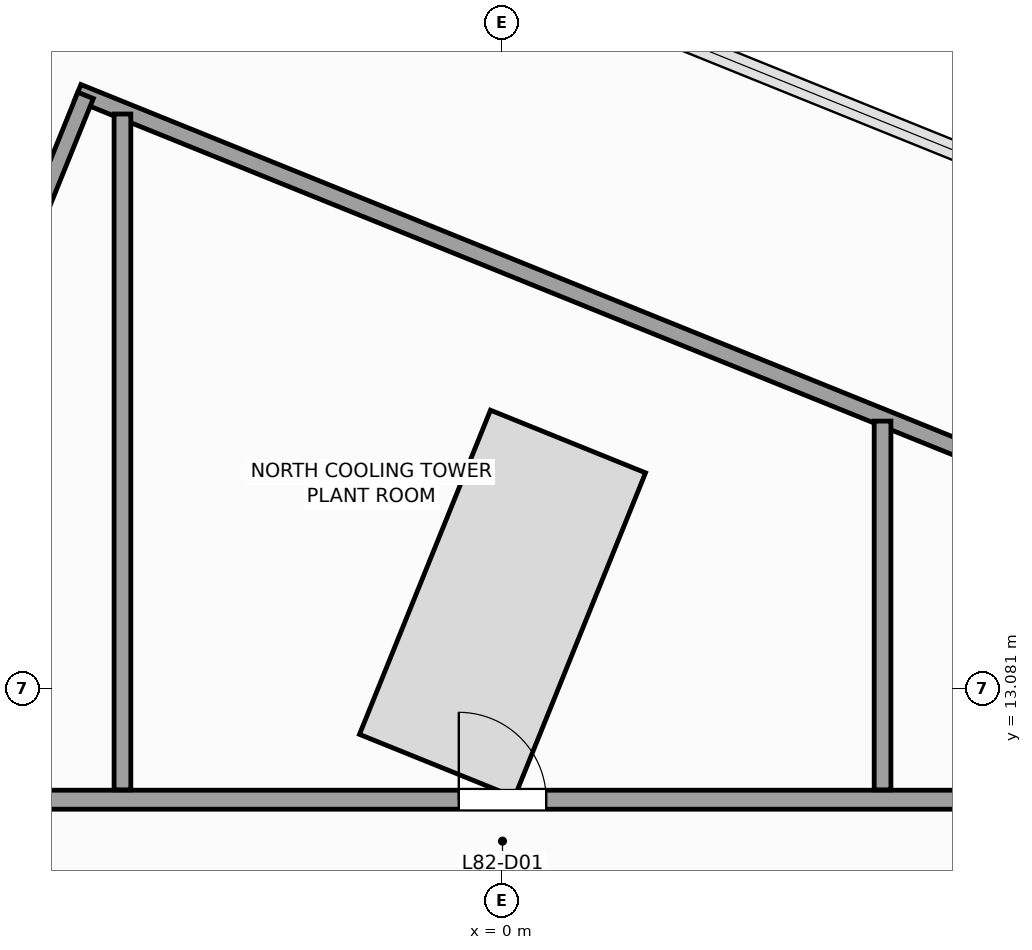
"""IFC4 building model, lengths in metres.
Left out: names, types, materials, properties, quantities, classifications, styles, units other than length and angle.
Written with IfcOpenShell. Run it as: python <this file> out.ifc"""

import sys

from ifc_helpers import new_model, si_unit, direction, frame, frame_2d, origin, place, context, subcontext, project, spatial, rectangle, extrude, source, transform, mapped, element, fill, save


model = new_model("IFC4")
c1 = context("Model", 3, precision=1e-05, world=origin(), true_north=direction((0.0, 1.0)))
c2 = subcontext(c1, "Body", "Model", "MODEL_VIEW")
j1 = project(units=[si_unit("LENGTHUNIT", "METRE"), si_unit("PLANEANGLEUNIT", "RADIAN")], contexts=[c1])
p1 = place(None, origin())
s1 = spatial("IfcSite", under=j1, at=p1, CompositionType="ELEMENT")
p2 = place(p1, origin())
s2 = spatial("IfcBuilding", under=s1, at=p2, CompositionType="ELEMENT")
p3 = place(p2, frame((0.0, 0.0, 333.6)))
s3 = spatial("IfcBuildingStorey", under=s2, at=p3, CompositionType="ELEMENT", Elevation=333.6)
p4 = place(p3, frame((18.556, 11.172, 0.0), z_axis=(0.0, 0.0, 1.0), x_axis=(-0.927181788521, 0.374611707018, 0.0)))
e1 = element("IfcWall", 1, at=p4, inside=s3, PredefinedType="PARTITIONING", context=c2, shape_type="SweptSolid", body=[
    extrude(rectangle(XDim=26.04, YDim=0.22, at=frame_2d((13.02, 0.0))), origin(), (0.0, 0.0, 1.0), 3.05),
])
p5 = place(p3, frame((-5.486, 20.886, 0.0), z_axis=(0.0, 0.0, 1.0), x_axis=(-0.374593321469, -0.927189216671, 0.0)))
e2 = element("IfcWall", 2, at=p5, inside=s3, PredefinedType="PARTITIONING", context=c2, shape_type="SweptSolid", body=[
    extrude(rectangle(XDim=4.4, YDim=0.22, at=frame_2d((2.2, 0.0))), origin(), (0.0, 0.0, 1.0), 3.7),
])
p6 = place(p3, frame((-10.32, 11.62, 0.0), z_axis=(0.0, 0.0, 1.0), x_axis=(1.0, 0.0, 0.0)))
e3 = element("IfcWall", 3, at=p6, inside=s3, PredefinedType="PARTITIONING", context=c2, shape_type="SweptSolid", body=[
    extrude(rectangle(XDim=21.94, YDim=0.25, at=frame_2d((10.97, 0.0))), origin(), (0.0, 0.0, 1.0), 3.7),
])
p7 = place(p6, frame((9.745, 0.0, 0.0)))
e4 = element("IfcOpeningElement", 4, at=p7, cuts=e3, PredefinedType="OPENING", context=c2, shape_type="SweptSolid", body=[
    extrude(rectangle(XDim=1.15, YDim=2.25, at=frame_2d((0.575, 1.125))), frame((0.0, 0.135, 0.0), z_axis=(0.0, -1.0, 0.0), x_axis=(1.0, 0.0, 0.0)), (0.0, 0.0, 1.0), 0.27),
])
p8 = place(p3, frame((-5.0, 11.75, 0.0), z_axis=(0.0, 0.0, 1.0), x_axis=(0.0, 1.0, 0.0)))
e5 = element("IfcWall", 5, at=p8, inside=s3, PredefinedType="PARTITIONING", context=c2, shape_type="SweptSolid", body=[
    extrude(rectangle(XDim=8.891, YDim=0.22, at=frame_2d((4.446, 0.0))), origin(), (0.0, 0.0, 1.0), 3.7),
])
p9 = place(p3, frame((5.0, 11.75, 0.0), z_axis=(0.0, 0.0, 1.0), x_axis=(0.0, 1.0, 0.0)))
e6 = element("IfcWall", 6, at=p9, inside=s3, PredefinedType="PARTITIONING", context=c2, shape_type="SweptSolid", body=[
    extrude(rectangle(XDim=4.851, YDim=0.22, at=frame_2d((2.425, 0.0))), origin(), (0.0, 0.0, 1.0), 3.7),
])
m1 = source(origin(), c2, "Body", "SweptSolid", [
    extrude(rectangle(XDim=1.15, YDim=2.25, at=frame_2d((0.575, 1.125))), frame((0.0, 0.025, 0.0), z_axis=(0.0, -1.0, 0.0), x_axis=(1.0, 0.0, 0.0)), (0.0, 0.0, 1.0), 0.05),
])
p10 = place(p7, origin())
e7 = element("IfcDoor", 7, at=p10, inside=s3, OperationType="SINGLE_SWING_LEFT", PredefinedType="DOOR", context=c2, shape_type="MappedRepresentation", body=[
    mapped(m1, transform((0.0, 0.0, 0.0), scale=1.0)),
])
fill(e4, e7)
save(model, sys.argv[1])
